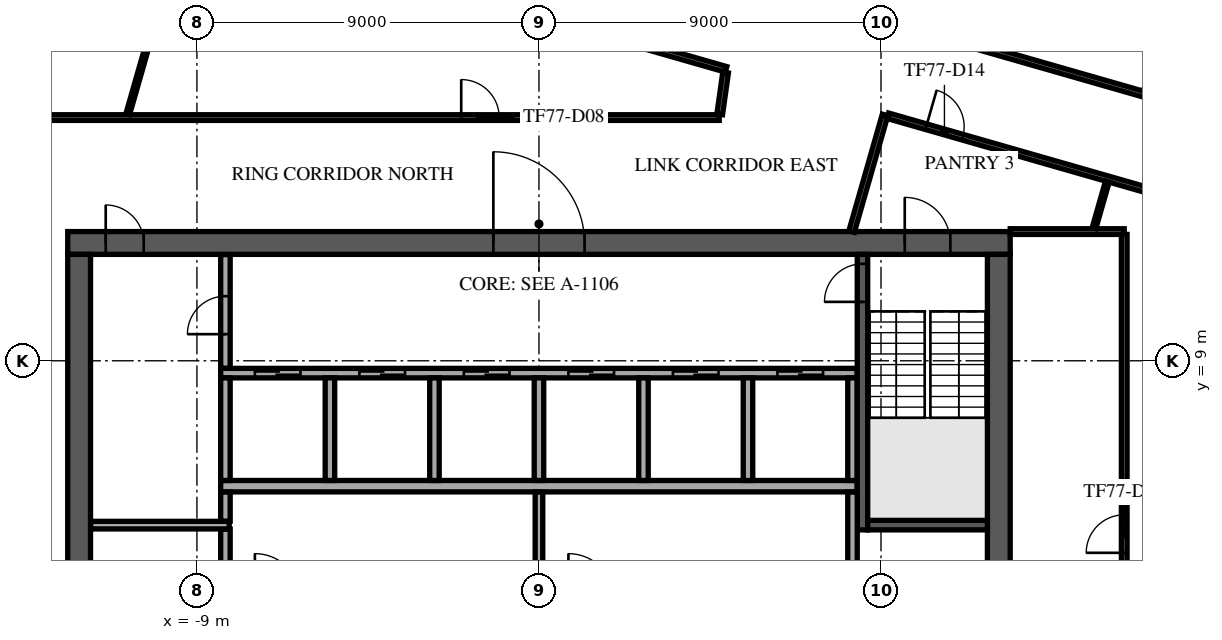
"""IFC4 building model, lengths in metres.
Left out: names, types, materials, properties, quantities, classifications, styles, units other than length and angle.
Written with IfcOpenShell. Run it as: python <this file> out.ifc"""

import sys

from ifc_helpers import new_model, si_unit, direction, frame, frame_2d, origin, place, context, subcontext, project, spatial, rectangle, extrude, element, fill, save


model = new_model("IFC4")
c1 = context("Model", 3, precision=1e-05, world=origin(), true_north=direction((0.0, 1.0)))
c2 = subcontext(c1, "Body", "Model", "MODEL_VIEW")
j1 = project(units=[si_unit("LENGTHUNIT", "METRE"), si_unit("PLANEANGLEUNIT", "RADIAN")], contexts=[c1])
p1 = place(None, origin())
s1 = spatial("IfcSite", under=j1, at=p1, CompositionType="ELEMENT")
p2 = place(p1, origin())
s2 = spatial("IfcBuilding", under=s1, at=p2, CompositionType="ELEMENT")
p3 = place(p2, frame((0.0, 0.0, 324.5)))
s3 = spatial("IfcBuildingStorey", under=s2, at=p3, CompositionType="ELEMENT", Elevation=324.5)
p4 = place(p3, frame((-12.4, 12.1, 0.0), z_axis=(0.0, 0.0, 1.0), x_axis=(1.0, 0.0, 0.0)))
e1 = element("IfcWall", 1, at=p4, inside=s3, PredefinedType="SHEAR", context=c2, shape_type="SweptSolid", body=[
    extrude(rectangle(XDim=24.8, YDim=0.6, at=frame_2d((12.4, 0.0))), origin(), (0.0, 0.0, 1.0), 3.65),
])
p5 = place(p4, frame((11.2, 0.0, 0.0)))
e2 = element("IfcOpeningElement", 2, at=p5, cuts=e1, PredefinedType="OPENING", context=c2, shape_type="SweptSolid", body=[
    extrude(rectangle(XDim=2.4, YDim=2.4, at=frame_2d((1.2, 1.2))), frame((0.0, 0.31, 0.0), z_axis=(0.0, -1.0, 0.0), x_axis=(1.0, 0.0, 0.0)), (0.0, 0.0, 1.0), 0.62),
])
p6 = place(p4, frame((22.025, 0.0, 0.0)))
e3 = element("IfcOpeningElement", 3, at=p6, cuts=e1, PredefinedType="OPENING", context=c2, shape_type="SweptSolid", body=[
    extrude(rectangle(XDim=1.2, YDim=2.1, at=frame_2d((0.6, 1.05))), frame((0.0, 0.31, 0.0), z_axis=(0.0, -1.0, 0.0), x_axis=(1.0, 0.0, 0.0)), (0.0, 0.0, 1.0), 0.62),
])
p7 = place(p4, frame((1.0, 0.0, 0.0)))
e4 = element("IfcOpeningElement", 4, at=p7, cuts=e1, PredefinedType="OPENING", context=c2, shape_type="SweptSolid", body=[
    extrude(rectangle(XDim=1.0, YDim=2.1, at=frame_2d((0.5, 1.05))), frame((0.0, 0.31, 0.0), z_axis=(0.0, -1.0, 0.0), x_axis=(1.0, 0.0, 0.0)), (0.0, 0.0, 1.0), 0.62),
])
p8 = place(p3, frame((12.1, -11.8, 0.0), z_axis=(0.0, 0.0, 1.0), x_axis=(0.0, 1.0, 0.0)))
e5 = element("IfcWall", 5, at=p8, inside=s3, PredefinedType="SHEAR", context=c2, shape_type="SweptSolid", body=[
    extrude(rectangle(XDim=23.6, YDim=0.6, at=frame_2d((11.8, 0.0))), origin(), (0.0, 0.0, 1.0), 3.65),
])
p9 = place(p8, frame((10.6, 0.0, 0.0)))
e6 = element("IfcOpeningElement", 6, at=p9, cuts=e5, PredefinedType="OPENING", context=c2, shape_type="SweptSolid", body=[
    extrude(rectangle(XDim=2.4, YDim=2.4, at=frame_2d((1.2, 1.2))), frame((0.0, 0.31, 0.0), z_axis=(0.0, -1.0, 0.0), x_axis=(1.0, 0.0, 0.0)), (0.0, 0.0, 1.0), 0.62),
])
p10 = place(p3, frame((-12.1, -11.8, 0.0), z_axis=(0.0, 0.0, 1.0), x_axis=(0.0, 1.0, 0.0)))
e7 = element("IfcWall", 7, at=p10, inside=s3, PredefinedType="SHEAR", context=c2, shape_type="SweptSolid", body=[
    extrude(rectangle(XDim=23.6, YDim=0.6, at=frame_2d((11.8, 0.0))), origin(), (0.0, 0.0, 1.0), 3.65),
])
p11 = place(p10, frame((10.6, 0.0, 0.0)))
e8 = element("IfcOpeningElement", 8, at=p11, cuts=e7, PredefinedType="OPENING", context=c2, shape_type="SweptSolid", body=[
    extrude(rectangle(XDim=2.4, YDim=2.4, at=frame_2d((1.2, 1.2))), frame((0.0, 0.31, 0.0), z_axis=(0.0, -1.0, 0.0), x_axis=(1.0, 0.0, 0.0)), (0.0, 0.0, 1.0), 0.62),
])
p12 = place(p3, frame((-8.375, 5.7, 0.0), z_axis=(0.0, 0.0, 1.0), x_axis=(1.0, 0.0, 0.0)))
e9 = element("IfcWall", 9, at=p12, inside=s3, PredefinedType="SOLIDWALL", context=c2, shape_type="SweptSolid", body=[
    extrude(rectangle(XDim=16.75, YDim=0.3, at=frame_2d((8.375, 0.0))), origin(), (0.0, 0.0, 1.0), 3.65),
])
p13 = place(p3, frame((-8.375, 8.675, 0.0), z_axis=(0.0, 0.0, 1.0), x_axis=(1.0, 0.0, 0.0)))
e10 = element("IfcWall", 10, at=p13, inside=s3, PredefinedType="SOLIDWALL", context=c2, shape_type="SweptSolid", body=[
    extrude(rectangle(XDim=16.75, YDim=0.25, at=frame_2d((8.375, 0.0))), origin(), (0.0, 0.0, 1.0), 3.65),
])
p14 = place(p13, frame((0.9, 0.0, 0.0)))
e11 = element("IfcOpeningElement", 11, at=p14, cuts=e10, PredefinedType="OPENING", context=c2, shape_type="SweptSolid", body=[
    extrude(rectangle(XDim=1.2, YDim=2.1, at=frame_2d((0.6, 1.05))), frame((0.0, 0.135, 0.0), z_axis=(0.0, -1.0, 0.0), x_axis=(1.0, 0.0, 0.0)), (0.0, 0.0, 1.0), 0.27),
])
p15 = place(p13, frame((3.65, 0.0, 0.0)))
e12 = element("IfcOpeningElement", 12, at=p15, cuts=e10, PredefinedType="OPENING", context=c2, shape_type="SweptSolid", body=[
    extrude(rectangle(XDim=1.2, YDim=2.1, at=frame_2d((0.6, 1.05))), frame((0.0, 0.135, 0.0), z_axis=(0.0, -1.0, 0.0), x_axis=(1.0, 0.0, 0.0)), (0.0, 0.0, 1.0), 0.27),
])
p16 = place(p13, frame((6.4, 0.0, 0.0)))
e13 = element("IfcOpeningElement", 13, at=p16, cuts=e10, PredefinedType="OPENING", context=c2, shape_type="SweptSolid", body=[
    extrude(rectangle(XDim=1.2, YDim=2.1, at=frame_2d((0.6, 1.05))), frame((0.0, 0.135, 0.0), z_axis=(0.0, -1.0, 0.0), x_axis=(1.0, 0.0, 0.0)), (0.0, 0.0, 1.0), 0.27),
])
p17 = place(p13, frame((9.15, 0.0, 0.0)))
e14 = element("IfcOpeningElement", 14, at=p17, cuts=e10, PredefinedType="OPENING", context=c2, shape_type="SweptSolid", body=[
    extrude(rectangle(XDim=1.2, YDim=2.1, at=frame_2d((0.6, 1.05))), frame((0.0, 0.135, 0.0), z_axis=(0.0, -1.0, 0.0), x_axis=(1.0, 0.0, 0.0)), (0.0, 0.0, 1.0), 0.27),
])
p18 = place(p13, frame((11.9, 0.0, 0.0)))
e15 = element("IfcOpeningElement", 15, at=p18, cuts=e10, PredefinedType="OPENING", context=c2, shape_type="SweptSolid", body=[
    extrude(rectangle(XDim=1.2, YDim=2.1, at=frame_2d((0.6, 1.05))), frame((0.0, 0.135, 0.0), z_axis=(0.0, -1.0, 0.0), x_axis=(1.0, 0.0, 0.0)), (0.0, 0.0, 1.0), 0.27),
])
p19 = place(p13, frame((14.65, 0.0, 0.0)))
e16 = element("IfcOpeningElement", 16, at=p19, cuts=e10, PredefinedType="OPENING", context=c2, shape_type="SweptSolid", body=[
    extrude(rectangle(XDim=1.2, YDim=2.1, at=frame_2d((0.6, 1.05))), frame((0.0, 0.135, 0.0), z_axis=(0.0, -1.0, 0.0), x_axis=(1.0, 0.0, 0.0)), (0.0, 0.0, 1.0), 0.27),
])
for number, where, z_axis, x_axis in (
    (17, (-8.25, 5.85, 0.0), (0.0, 0.0, 1.0), (0.0, 1.0, 0.0)),
    (18, (-5.5, 5.85, 0.0), (0.0, 0.0, 1.0), (0.0, 1.0, 0.0)),
    (19, (-2.75, 5.85, 0.0), (0.0, 0.0, 1.0), (0.0, 1.0, 0.0)),
    (20, (0.0, 5.85, 0.0), (0.0, 0.0, 1.0), (0.0, 1.0, 0.0)),
    (21, (2.75, 5.85, 0.0), (0.0, 0.0, 1.0), (0.0, 1.0, 0.0)),
    (22, (5.5, 5.85, 0.0), (0.0, 0.0, 1.0), (0.0, 1.0, 0.0)),
    (23, (8.25, 5.85, 0.0), (0.0, 0.0, 1.0), (0.0, 1.0, 0.0)),
):
    element("IfcWall", number, at=place(p3, frame(where, z_axis=z_axis, x_axis=x_axis)), inside=s3, PredefinedType="SOLIDWALL", context=c2, shape_type="SweptSolid", body=[
        extrude(rectangle(XDim=2.7, YDim=0.25, at=frame_2d((1.35, 0.0))), origin(), (0.0, 0.0, 1.0), 3.65),
    ])
p20 = place(p3, frame((8.512, 4.55, 0.0), z_axis=(0.0, 0.0, 1.0), x_axis=(0.0, 1.0, 0.0)))
e24 = element("IfcWall", 24, at=p20, inside=s3, PredefinedType="SOLIDWALL", context=c2, shape_type="SweptSolid", body=[
    extrude(rectangle(XDim=7.25, YDim=0.275, at=frame_2d((3.625, 0.0))), origin(), (0.0, 0.0, 1.0), 3.65),
])
p21 = place(p20, frame((6.0, 0.0, 0.0)))
e25 = element("IfcOpeningElement", 25, at=p21, cuts=e24, PredefinedType="OPENING", context=c2, shape_type="SweptSolid", body=[
    extrude(rectangle(XDim=1.0, YDim=2.1, at=frame_2d((0.5, 1.05))), frame((0.0, 0.147, 0.0), z_axis=(0.0, -1.0, 0.0), x_axis=(1.0, 0.0, 0.0)), (0.0, 0.0, 1.0), 0.295),
])
p22 = place(p3, frame((8.65, 4.675, 0.0), z_axis=(0.0, 0.0, 1.0), x_axis=(1.0, 0.0, 0.0)))
e26 = element("IfcWall", 26, at=p22, inside=s3, PredefinedType="SOLIDWALL", context=c2, shape_type="SweptSolid", body=[
    extrude(rectangle(XDim=3.15, YDim=0.25, at=frame_2d((1.575, 0.0))), origin(), (0.0, 0.0, 1.0), 3.65),
])
p23 = place(p3, frame((-8.25, 2.855, 0.0), z_axis=(0.0, 0.0, 1.0), x_axis=(0.0, 1.0, 0.0)))
e27 = element("IfcWall", 27, at=p23, inside=s3, PredefinedType="PARTITIONING", context=c2, shape_type="SweptSolid", body=[
    extrude(rectangle(XDim=1.715, YDim=0.25, at=frame_2d((0.857, 0.0))), origin(), (0.0, 0.0, 1.0), 3.65),
])
p24 = place(p3, frame((0.0, 2.855, 0.0), z_axis=(0.0, 0.0, 1.0), x_axis=(0.0, 1.0, 0.0)))
e28 = element("IfcWall", 28, at=p24, inside=s3, PredefinedType="PARTITIONING", context=c2, shape_type="SweptSolid", body=[
    extrude(rectangle(XDim=2.69, YDim=0.2, at=frame_2d((1.345, 0.0))), origin(), (0.0, 0.0, 1.0), 3.65),
])
p25 = place(p3, frame((8.25, 2.855, 0.0), z_axis=(0.0, 0.0, 1.0), x_axis=(0.0, 1.0, 0.0)))
e29 = element("IfcWall", 29, at=p25, inside=s3, PredefinedType="PARTITIONING", context=c2, shape_type="SweptSolid", body=[
    extrude(rectangle(XDim=2.69, YDim=0.25, at=frame_2d((1.345, 0.0))), origin(), (0.0, 0.0, 1.0), 3.65),
])
p26 = place(p3, frame((-11.795, 4.675, 0.0), z_axis=(0.0, 0.0, 1.0), x_axis=(1.0, 0.0, 0.0)))
e30 = element("IfcWall", 30, at=p26, inside=s3, PredefinedType="PARTITIONING", context=c2, shape_type="SweptSolid", body=[
    extrude(rectangle(XDim=3.645, YDim=0.2, at=frame_2d((1.823, 0.0))), origin(), (0.0, 0.0, 1.0), 3.65),
])
p27 = place(p3, frame((-8.25, 4.78, 0.0), z_axis=(0.0, 0.0, 1.0), x_axis=(0.0, 1.0, 0.0)))
e31 = element("IfcWall", 31, at=p27, inside=s3, PredefinedType="PARTITIONING", context=c2, shape_type="SweptSolid", body=[
    extrude(rectangle(XDim=0.765, YDim=0.25, at=frame_2d((0.382, 0.0))), origin(), (0.0, 0.0, 1.0), 3.65),
])
p28 = place(p3, frame((-8.25, 8.805, 0.0), z_axis=(0.0, 0.0, 1.0), x_axis=(0.0, 1.0, 0.0)))
e32 = element("IfcWall", 32, at=p28, inside=s3, PredefinedType="PARTITIONING", context=c2, shape_type="SweptSolid", body=[
    extrude(rectangle(XDim=2.99, YDim=0.25, at=frame_2d((1.495, 0.0))), origin(), (0.0, 0.0, 1.0), 3.65),
])
p29 = place(p28, frame((0.895, 0.0, 0.0)))
e33 = element("IfcOpeningElement", 33, at=p29, cuts=e32, PredefinedType="OPENING", context=c2, shape_type="SweptSolid", body=[
    extrude(rectangle(XDim=1.0, YDim=2.1, at=frame_2d((0.5, 1.05))), frame((0.0, 0.135, 0.0), z_axis=(0.0, -1.0, 0.0), x_axis=(1.0, 0.0, 0.0)), (0.0, 0.0, 1.0), 0.27),
])
p30 = place(p3, frame((-15.325, 15.4, 0.0), z_axis=(0.0, 0.0, 1.0), x_axis=(1.0, 0.0, 0.0)))
e34 = element("IfcWall", 34, at=p30, inside=s3, PredefinedType="PARTITIONING", context=c2, shape_type="SweptSolid", body=[
    extrude(rectangle(XDim=20.069, YDim=0.15, at=frame_2d((10.034, 0.0))), origin(), (0.0, 0.0, 1.0), 3.25),
])
p31 = place(p30, frame((13.279, 0.0, 0.0)))
e35 = element("IfcOpeningElement", 35, at=p31, cuts=e34, PredefinedType="OPENING", context=c2, shape_type="SweptSolid", body=[
    extrude(rectangle(XDim=1.0, YDim=2.1, at=frame_2d((0.5, 1.05))), frame((0.0, 0.085, 0.0), z_axis=(0.0, -1.0, 0.0), x_axis=(1.0, 0.0, 0.0)), (0.0, 0.0, 1.0), 0.17),
])
p32 = place(p3, frame((-13.764, 22.027, 0.0), z_axis=(0.0, 0.0, 1.0), x_axis=(0.961261913281, -0.275636597851, 0.0)))
e36 = element("IfcWall", 36, at=p32, inside=s3, PredefinedType="PARTITIONING", context=c2, shape_type="SweptSolid", body=[
    extrude(rectangle(XDim=19.44, YDim=0.15, at=frame_2d((9.72, 0.0))), origin(), (0.0, 0.0, 1.0), 3.25),
])
p33 = place(p3, frame((-13.103, 24.334, 0.0), z_axis=(0.0, 0.0, 1.0), x_axis=(0.961265813226, -0.275622996723, 0.0)))
e37 = element("IfcWall", 37, at=p33, inside=s3, PredefinedType="PARTITIONING", context=c2, shape_type="SweptSolid", body=[
    extrude(rectangle(XDim=38.68, YDim=0.15, at=frame_2d((19.34, 0.0))), origin(), (0.0, 0.0, 1.0), 3.25),
])
p34 = place(p33, frame((7.05, 0.0, 0.0)))
e38 = element("IfcOpeningElement", 38, at=p34, cuts=e37, PredefinedType="OPENING", context=c2, shape_type="SweptSolid", body=[
    extrude(rectangle(XDim=1.8, YDim=2.1, at=frame_2d((0.9, 1.05))), frame((0.0, 0.085, 0.0), z_axis=(0.0, -1.0, 0.0), x_axis=(1.0, 0.0, 0.0)), (0.0, 0.0, 1.0), 0.17),
])
p35 = place(p33, frame((19.547, 0.0, 0.0)))
e39 = element("IfcOpeningElement", 39, at=p35, cuts=e37, PredefinedType="OPENING", context=c2, shape_type="SweptSolid", body=[
    extrude(rectangle(XDim=1.0, YDim=2.1, at=frame_2d((0.5, 1.05))), frame((0.0, 0.085, 0.0), z_axis=(0.0, -1.0, 0.0), x_axis=(1.0, 0.0, 0.0)), (0.0, 0.0, 1.0), 0.17),
])
p36 = place(p33, frame((24.893, 0.0, 0.0)))
e40 = element("IfcOpeningElement", 40, at=p36, cuts=e37, PredefinedType="OPENING", context=c2, shape_type="SweptSolid", body=[
    extrude(rectangle(XDim=1.0, YDim=2.1, at=frame_2d((0.5, 1.05))), frame((0.0, 0.085, 0.0), z_axis=(0.0, -1.0, 0.0), x_axis=(1.0, 0.0, 0.0)), (0.0, 0.0, 1.0), 0.17),
])
p37 = place(p33, frame((31.243, 0.0, 0.0)))
e41 = element("IfcOpeningElement", 41, at=p37, cuts=e37, PredefinedType="OPENING", context=c2, shape_type="SweptSolid", body=[
    extrude(rectangle(XDim=1.8, YDim=2.1, at=frame_2d((0.9, 1.05))), frame((0.0, 0.085, 0.0), z_axis=(0.0, -1.0, 0.0), x_axis=(1.0, 0.0, 0.0)), (0.0, 0.0, 1.0), 0.17),
])
p38 = place(p3, frame((4.756, 15.486, 0.0), z_axis=(0.0, 0.0, 1.0), x_axis=(0.139602323869, 0.990207650531, 0.0)))
e42 = element("IfcWall", 42, at=p38, inside=s3, PredefinedType="PARTITIONING", context=c2, shape_type="SweptSolid", body=[
    extrude(rectangle(XDim=1.109, YDim=0.15, at=frame_2d((0.554, 0.0))), origin(), (0.0, 0.0, 1.0), 3.65),
])
p39 = place(p3, frame((8.227, 12.4, 0.0), z_axis=(0.0, 0.0, 1.0), x_axis=(0.275589573409, 0.961275396038, 0.0)))
e43 = element("IfcWall", 43, at=p39, inside=s3, PredefinedType="PARTITIONING", context=c2, shape_type="SweptSolid", body=[
    extrude(rectangle(XDim=3.193, YDim=0.15, at=frame_2d((1.596, 0.0))), origin(), (0.0, 0.0, 1.0), 3.25),
])
p40 = place(p3, frame((9.179, 15.448, 0.0), z_axis=(0.0, 0.0, 1.0), x_axis=(0.961267886057, -0.275615767392, 0.0)))
e44 = element("IfcWall", 44, at=p40, inside=s3, PredefinedType="PARTITIONING", context=c2, shape_type="SweptSolid", body=[
    extrude(rectangle(XDim=14.812, YDim=0.15, at=frame_2d((7.406, 0.0))), origin(), (0.0, 0.0, 1.0), 3.25),
])
p41 = place(p40, frame((1.05, 0.0, 0.0)))
e45 = element("IfcOpeningElement", 45, at=p41, cuts=e44, PredefinedType="OPENING", context=c2, shape_type="SweptSolid", body=[
    extrude(rectangle(XDim=1.0, YDim=2.1, at=frame_2d((0.5, 1.05))), frame((0.0, 0.085, 0.0), z_axis=(0.0, -1.0, 0.0), x_axis=(1.0, 0.0, 0.0)), (0.0, 0.0, 1.0), 0.17),
])
p42 = place(p3, frame((12.4, 12.4, 0.0), z_axis=(0.0, 0.0, 1.0), x_axis=(1.0, 0.0, 0.0)))
e46 = element("IfcWall", 46, at=p42, inside=s3, PredefinedType="PARTITIONING", context=c2, shape_type="SweptSolid", body=[
    extrude(rectangle(XDim=3.0, YDim=0.15, at=frame_2d((1.5, 0.0))), origin(), (0.0, 0.0, 1.0), 3.13),
])
p43 = place(p3, frame((15.4, -15.325, 0.0), z_axis=(0.0, 0.0, 1.0), x_axis=(0.0, 1.0, 0.0)))
e47 = element("IfcWall", 47, at=p43, inside=s3, PredefinedType="PARTITIONING", context=c2, shape_type="SweptSolid", body=[
    extrude(rectangle(XDim=27.65, YDim=0.15, at=frame_2d((13.825, 0.0))), origin(), (0.0, 0.0, 1.0), 3.25),
])
p44 = place(p43, frame((2.05, 0.0, 0.0)))
e48 = element("IfcOpeningElement", 48, at=p44, cuts=e47, PredefinedType="OPENING", context=c2, shape_type="SweptSolid", body=[
    extrude(rectangle(XDim=1.0, YDim=2.1, at=frame_2d((0.5, 1.05))), frame((0.0, 0.085, 0.0), z_axis=(0.0, -1.0, 0.0), x_axis=(1.0, 0.0, 0.0)), (0.0, 0.0, 1.0), 0.17),
])
p45 = place(p43, frame((9.474, 0.0, 0.0)))
e49 = element("IfcOpeningElement", 49, at=p45, cuts=e47, PredefinedType="OPENING", context=c2, shape_type="SweptSolid", body=[
    extrude(rectangle(XDim=1.0, YDim=2.1, at=frame_2d((0.5, 1.05))), frame((0.0, 0.085, 0.0), z_axis=(0.0, -1.0, 0.0), x_axis=(1.0, 0.0, 0.0)), (0.0, 0.0, 1.0), 0.17),
])
p46 = place(p43, frame((19.271, 0.0, 0.0)))
e50 = element("IfcOpeningElement", 50, at=p46, cuts=e47, PredefinedType="OPENING", context=c2, shape_type="SweptSolid", body=[
    extrude(rectangle(XDim=1.0, YDim=2.1, at=frame_2d((0.5, 1.05))), frame((0.0, 0.085, 0.0), z_axis=(0.0, -1.0, 0.0), x_axis=(1.0, 0.0, 0.0)), (0.0, 0.0, 1.0), 0.17),
])
p47 = place(p3, frame((-10.821, 15.489, 0.0), z_axis=(0.0, 0.0, 1.0), x_axis=(0.275724251057, 0.961236774879, 0.0)))
e51 = element("IfcWall", 51, at=p47, inside=s3, PredefinedType="PARTITIONING", context=c2, shape_type="SweptSolid", body=[
    extrude(rectangle(XDim=5.399, YDim=0.1, at=frame_2d((2.7, 0.0))), origin(), (0.0, 0.0, 1.0), 3.65),
])
p48 = place(p3, frame((14.604, 12.489, 0.0), z_axis=(0.0, 0.0, 1.0), x_axis=(0.275303052491, 0.96135749297, 0.0)))
e52 = element("IfcWall", 52, at=p48, inside=s3, PredefinedType="PARTITIONING", context=c2, shape_type="SweptSolid", body=[
    extrude(rectangle(XDim=1.274, YDim=0.1, at=frame_2d((0.637, 0.0))), origin(), (0.0, 0.0, 1.0), 3.25),
])
p49 = place(p5, origin())
e53 = element("IfcDoor", 53, at=p49, inside=s3, OperationType="SINGLE_SWING_LEFT", PredefinedType="DOOR", context=c2, shape_type="SweptSolid", body=[
    extrude(rectangle(XDim=2.4, YDim=2.4, at=frame_2d((1.2, 1.2))), frame((0.0, 0.025, 0.0), z_axis=(0.0, -1.0, 0.0), x_axis=(1.0, 0.0, 0.0)), (0.0, 0.0, 1.0), 0.05),
])
fill(e2, e53)
p50 = place(p6, origin())
e54 = element("IfcDoor", 54, at=p50, inside=s3, OperationType="SINGLE_SWING_LEFT", PredefinedType="DOOR", context=c2, shape_type="SweptSolid", body=[
    extrude(rectangle(XDim=1.2, YDim=2.1, at=frame_2d((0.6, 1.05))), frame((0.0, 0.025, 0.0), z_axis=(0.0, -1.0, 0.0), x_axis=(1.0, 0.0, 0.0)), (0.0, 0.0, 1.0), 0.05),
])
fill(e3, e54)
p51 = place(p7, origin())
e55 = element("IfcDoor", 55, at=p51, inside=s3, OperationType="SINGLE_SWING_LEFT", PredefinedType="DOOR", context=c2, shape_type="SweptSolid", body=[
    extrude(rectangle(XDim=1.0, YDim=2.1, at=frame_2d((0.5, 1.05))), frame((0.0, 0.025, 0.0), z_axis=(0.0, -1.0, 0.0), x_axis=(1.0, 0.0, 0.0)), (0.0, 0.0, 1.0), 0.05),
])
fill(e4, e55)
p52 = place(p14, origin())
e56 = element("IfcDoor", 56, at=p52, inside=s3, OperationType="DOUBLE_DOOR_SLIDING", PredefinedType="DOOR", context=c2, shape_type="SweptSolid", body=[
    extrude(rectangle(XDim=1.2, YDim=2.1, at=frame_2d((0.6, 1.05))), frame((0.0, 0.025, 0.0), z_axis=(0.0, -1.0, 0.0), x_axis=(1.0, 0.0, 0.0)), (0.0, 0.0, 1.0), 0.05),
])
fill(e11, e56)
p53 = place(p15, origin())
e57 = element("IfcDoor", 57, at=p53, inside=s3, OperationType="DOUBLE_DOOR_SLIDING", PredefinedType="DOOR", context=c2, shape_type="SweptSolid", body=[
    extrude(rectangle(XDim=1.2, YDim=2.1, at=frame_2d((0.6, 1.05))), frame((0.0, 0.025, 0.0), z_axis=(0.0, -1.0, 0.0), x_axis=(1.0, 0.0, 0.0)), (0.0, 0.0, 1.0), 0.05),
])
fill(e12, e57)
p54 = place(p16, origin())
e58 = element("IfcDoor", 58, at=p54, inside=s3, OperationType="DOUBLE_DOOR_SLIDING", PredefinedType="DOOR", context=c2, shape_type="SweptSolid", body=[
    extrude(rectangle(XDim=1.2, YDim=2.1, at=frame_2d((0.6, 1.05))), frame((0.0, 0.025, 0.0), z_axis=(0.0, -1.0, 0.0), x_axis=(1.0, 0.0, 0.0)), (0.0, 0.0, 1.0), 0.05),
])
fill(e13, e58)
p55 = place(p17, origin())
e59 = element("IfcDoor", 59, at=p55, inside=s3, OperationType="DOUBLE_DOOR_SLIDING", PredefinedType="DOOR", context=c2, shape_type="SweptSolid", body=[
    extrude(rectangle(XDim=1.2, YDim=2.1, at=frame_2d((0.6, 1.05))), frame((0.0, 0.025, 0.0), z_axis=(0.0, -1.0, 0.0), x_axis=(1.0, 0.0, 0.0)), (0.0, 0.0, 1.0), 0.05),
])
fill(e14, e59)
p56 = place(p18, origin())
e60 = element("IfcDoor", 60, at=p56, inside=s3, OperationType="DOUBLE_DOOR_SLIDING", PredefinedType="DOOR", context=c2, shape_type="SweptSolid", body=[
    extrude(rectangle(XDim=1.2, YDim=2.1, at=frame_2d((0.6, 1.05))), frame((0.0, 0.025, 0.0), z_axis=(0.0, -1.0, 0.0), x_axis=(1.0, 0.0, 0.0)), (0.0, 0.0, 1.0), 0.05),
])
fill(e15, e60)
p57 = place(p19, origin())
e61 = element("IfcDoor", 61, at=p57, inside=s3, OperationType="DOUBLE_DOOR_SLIDING", PredefinedType="DOOR", context=c2, shape_type="SweptSolid", body=[
    extrude(rectangle(XDim=1.2, YDim=2.1, at=frame_2d((0.6, 1.05))), frame((0.0, 0.025, 0.0), z_axis=(0.0, -1.0, 0.0), x_axis=(1.0, 0.0, 0.0)), (0.0, 0.0, 1.0), 0.05),
])
fill(e16, e61)
p58 = place(p21, origin())
e62 = element("IfcDoor", 62, at=p58, inside=s3, OperationType="SINGLE_SWING_LEFT", PredefinedType="DOOR", context=c2, shape_type="SweptSolid", body=[
    extrude(rectangle(XDim=1.0, YDim=2.1, at=frame_2d((0.5, 1.05))), frame((0.0, 0.025, 0.0), z_axis=(0.0, -1.0, 0.0), x_axis=(1.0, 0.0, 0.0)), (0.0, 0.0, 1.0), 0.05),
])
fill(e25, e62)
p59 = place(p29, origin())
e63 = element("IfcDoor", 63, at=p59, inside=s3, OperationType="SINGLE_SWING_RIGHT", PredefinedType="DOOR", context=c2, shape_type="SweptSolid", body=[
    extrude(rectangle(XDim=1.0, YDim=2.1, at=frame_2d((0.5, 1.05))), frame((0.0, 0.025, 0.0), z_axis=(0.0, -1.0, 0.0), x_axis=(1.0, 0.0, 0.0)), (0.0, 0.0, 1.0), 0.05),
])
fill(e33, e63)
p60 = place(p31, origin())
e64 = element("IfcDoor", 64, at=p60, inside=s3, OperationType="SINGLE_SWING_LEFT", PredefinedType="DOOR", context=c2, shape_type="SweptSolid", body=[
    extrude(rectangle(XDim=1.0, YDim=2.1, at=frame_2d((0.5, 1.05))), frame((0.0, 0.025, 0.0), z_axis=(0.0, -1.0, 0.0), x_axis=(1.0, 0.0, 0.0)), (0.0, 0.0, 1.0), 0.05),
])
fill(e35, e64)
p61 = place(p41, frame((1.0, 0.0, 0.0), z_axis=(0.0, 0.0, 1.0), x_axis=(-1.0, 0.0, 0.0)))
e65 = element("IfcDoor", 65, at=p61, inside=s3, OperationType="SINGLE_SWING_RIGHT", PredefinedType="DOOR", context=c2, shape_type="SweptSolid", body=[
    extrude(rectangle(XDim=1.0, YDim=2.1, at=frame_2d((0.5, 1.05))), frame((0.0, 0.025, 0.0), z_axis=(0.0, -1.0, 0.0), x_axis=(1.0, 0.0, 0.0)), (0.0, 0.0, 1.0), 0.05),
])
fill(e45, e65)
p62 = place(p46, frame((1.0, 0.0, 0.0), z_axis=(0.0, 0.0, 1.0), x_axis=(-1.0, 0.0, 0.0)))
e66 = element("IfcDoor", 66, at=p62, inside=s3, OperationType="SINGLE_SWING_LEFT", PredefinedType="DOOR", context=c2, shape_type="SweptSolid", body=[
    extrude(rectangle(XDim=1.0, YDim=2.1, at=frame_2d((0.5, 1.05))), frame((0.0, 0.025, 0.0), z_axis=(0.0, -1.0, 0.0), x_axis=(1.0, 0.0, 0.0)), (0.0, 0.0, 1.0), 0.05),
])
fill(e50, e66)
save(model, sys.argv[1])
